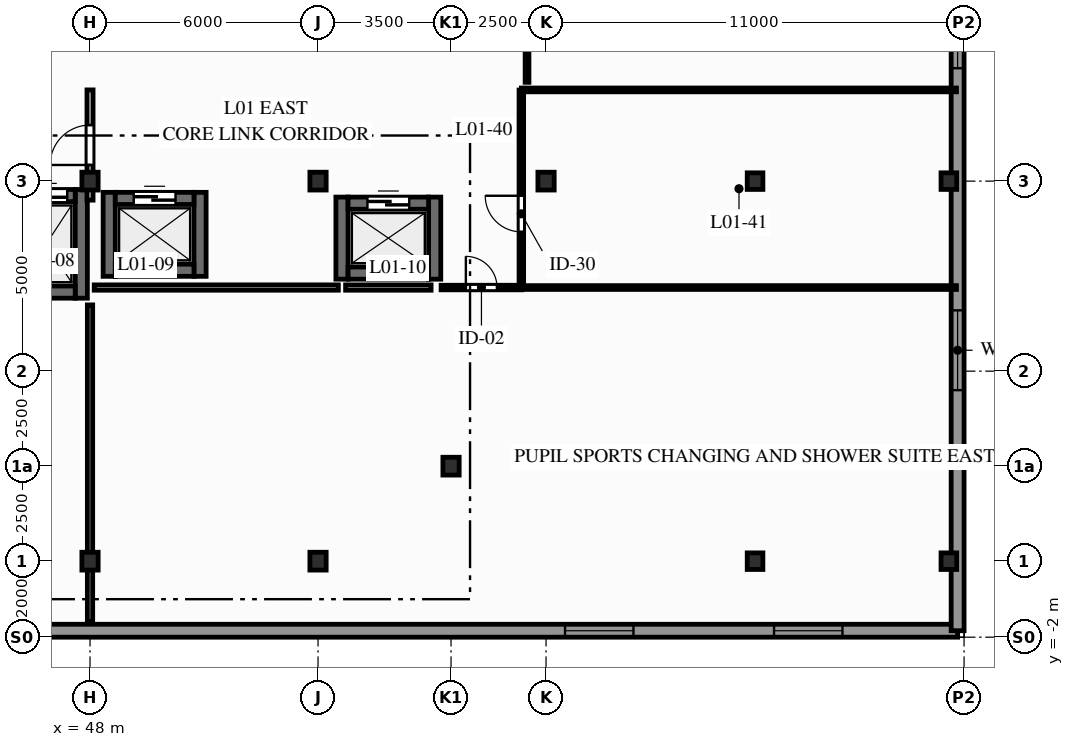
"""IFC4 building model, lengths in metres.
Left out: names, types, materials, properties, quantities, classifications, styles, units other than length and angle.
Written with IfcOpenShell. Run it as: python <this file> out.ifc"""

import sys

from ifc_helpers import new_model, si_unit, direction, frame, frame_2d, origin, origin_2d, place, context, subcontext, project, spatial, rectangle, i_section, extrude, element, fill, save


model = new_model("IFC4")
c1 = context("Model", 3, precision=1e-05, world=origin(), true_north=direction((0.0, 1.0)))
c2 = subcontext(c1, "Body", "Model", "MODEL_VIEW")
j1 = project(units=[si_unit("LENGTHUNIT", "METRE"), si_unit("PLANEANGLEUNIT", "RADIAN")], contexts=[c1])
p1 = place(None, origin())
s1 = spatial("IfcSite", under=j1, at=p1, CompositionType="ELEMENT")
p2 = place(p1, origin())
s2 = spatial("IfcBuilding", under=s1, at=p2, CompositionType="ELEMENT")
p3 = place(p2, frame((0.0, 0.0, 4.5)))
s3 = spatial("IfcBuildingStorey", under=s2, at=p3, CompositionType="ELEMENT", Elevation=4.5)
for number, where, z_axis, x_axis in (
    (1, (48.0, 0.0, 0.0), (0.0, 0.0, 1.0), (1.0, 0.0, 0.0)),
    (2, (48.0, 10.0, 0.0), (0.0, 0.0, 1.0), (1.0, 0.0, 0.0)),
    (3, (54.0, 0.0, 0.0), (0.0, 0.0, 1.0), (1.0, 0.0, 0.0)),
    (4, (54.0, 10.0, 0.0), (0.0, 0.0, 1.0), (1.0, 0.0, 0.0)),
    (5, (57.5, 2.5, 0.0), (0.0, 0.0, 1.0), (1.0, 0.0, 0.0)),
    (6, (60.0, 10.0, 0.0), (0.0, 0.0, 1.0), (1.0, 0.0, 0.0)),
):
    element("IfcColumn", number, at=place(p3, frame(where, z_axis=z_axis, x_axis=x_axis)), inside=s3, PredefinedType="COLUMN", context=c2, shape_type="SweptSolid", body=[
        extrude(i_section(OverallWidth=0.428, OverallDepth=0.469, WebThickness=0.078, FlangeThickness=0.125, FilletRadius=0.015, at=origin_2d()), origin(), (0.0, 0.0, 1.0), 4.5),
    ])
for number, where, z_axis, x_axis in (
    (7, (65.5, 0.0, 0.0), (0.0, 0.0, 1.0), (1.0, 0.0, 0.0)),
    (8, (65.5, 10.0, 0.0), (0.0, 0.0, 1.0), (1.0, 0.0, 0.0)),
    (9, (70.6, 0.0, 0.0), (0.0, 0.0, 1.0), (1.0, 0.0, 0.0)),
    (10, (70.6, 10.0, 0.0), (0.0, 0.0, 1.0), (1.0, 0.0, 0.0)),
):
    element("IfcColumn", number, at=place(p3, frame(where, z_axis=z_axis, x_axis=x_axis)), inside=s3, PredefinedType="COLUMN", context=c2, shape_type="SweptSolid", body=[
        extrude(i_section(OverallWidth=0.412, OverallDepth=0.437, WebThickness=0.036, FlangeThickness=0.058, FilletRadius=0.015, at=origin_2d()), origin(), (0.0, 0.0, 1.0), 4.5),
    ])
p4 = place(p3, frame((-10.83, -1.83, 0.0), z_axis=(0.0, 0.0, 1.0), x_axis=(1.0, 0.0, 0.0)))
e11 = element("IfcWall", 11, at=p4, inside=s3, PredefinedType="STANDARD", context=c2, shape_type="SweptSolid", body=[
    extrude(rectangle(XDim=81.66, YDim=0.34, at=frame_2d((40.83, 0.0))), origin(), (0.0, 0.0, 1.0), 4.22),
])
p5 = place(p4, frame((2.83, 0.0, 0.9)))
e12 = element("IfcOpeningElement", 12, at=p5, cuts=e11, PredefinedType="OPENING", context=c2, shape_type="SweptSolid", body=[
    extrude(rectangle(XDim=1.8, YDim=1.95, at=frame_2d((0.9, 0.975))), frame((0.0, 0.18, 0.0), z_axis=(0.0, -1.0, 0.0), x_axis=(1.0, 0.0, 0.0)), (0.0, 0.0, 1.0), 0.36),
])
p6 = place(p4, frame((8.33, 0.0, 0.9)))
e13 = element("IfcOpeningElement", 13, at=p6, cuts=e11, PredefinedType="OPENING", context=c2, shape_type="SweptSolid", body=[
    extrude(rectangle(XDim=1.8, YDim=1.95, at=frame_2d((0.9, 0.975))), frame((0.0, 0.18, 0.0), z_axis=(0.0, -1.0, 0.0), x_axis=(1.0, 0.0, 0.0)), (0.0, 0.0, 1.0), 0.36),
])
p7 = place(p4, frame((71.33, 0.0, 0.9)))
e14 = element("IfcOpeningElement", 14, at=p7, cuts=e11, PredefinedType="OPENING", context=c2, shape_type="SweptSolid", body=[
    extrude(rectangle(XDim=1.8, YDim=1.95, at=frame_2d((0.9, 0.975))), frame((0.0, 0.18, 0.0), z_axis=(0.0, -1.0, 0.0), x_axis=(1.0, 0.0, 0.0)), (0.0, 0.0, 1.0), 0.36),
])
p8 = place(p4, frame((76.83, 0.0, 0.9)))
e15 = element("IfcOpeningElement", 15, at=p8, cuts=e11, PredefinedType="OPENING", context=c2, shape_type="SweptSolid", body=[
    extrude(rectangle(XDim=1.8, YDim=1.95, at=frame_2d((0.9, 0.975))), frame((0.0, 0.18, 0.0), z_axis=(0.0, -1.0, 0.0), x_axis=(1.0, 0.0, 0.0)), (0.0, 0.0, 1.0), 0.36),
])
p9 = place(p3, frame((70.83, -1.83, 0.0), z_axis=(0.0, 0.0, 1.0), x_axis=(0.0, 1.0, 0.0)))
e16 = element("IfcWall", 16, at=p9, inside=s3, PredefinedType="STANDARD", context=c2, shape_type="SweptSolid", body=[
    extrude(rectangle(XDim=36.43, YDim=0.34, at=frame_2d((18.215, 0.0))), origin(), (0.0, 0.0, 1.0), 3.583),
])
p10 = place(p9, frame((6.33, 0.0, 0.9)))
e17 = element("IfcOpeningElement", 17, at=p10, cuts=e16, PredefinedType="OPENING", context=c2, shape_type="SweptSolid", body=[
    extrude(rectangle(XDim=2.1, YDim=2.05, at=frame_2d((1.05, 1.025))), frame((0.0, 0.18, 0.0), z_axis=(0.0, -1.0, 0.0), x_axis=(1.0, 0.0, 0.0)), (0.0, 0.0, 1.0), 0.36),
])
p11 = place(p9, frame((14.8, 0.0, 0.9)))
e18 = element("IfcOpeningElement", 18, at=p11, cuts=e16, PredefinedType="OPENING", context=c2, shape_type="SweptSolid", body=[
    extrude(rectangle(XDim=2.1, YDim=2.05, at=frame_2d((1.05, 1.025))), frame((0.0, 0.18, 0.0), z_axis=(0.0, -1.0, 0.0), x_axis=(1.0, 0.0, 0.0)), (0.0, 0.0, 1.0), 0.36),
])
p12 = place(p9, frame((21.03, 0.0, 0.9)))
e19 = element("IfcOpeningElement", 19, at=p12, cuts=e16, PredefinedType="OPENING", context=c2, shape_type="SweptSolid", body=[
    extrude(rectangle(XDim=2.1, YDim=2.05, at=frame_2d((1.05, 1.025))), frame((0.0, 0.18, 0.0), z_axis=(0.0, -1.0, 0.0), x_axis=(1.0, 0.0, 0.0)), (0.0, 0.0, 1.0), 0.36),
])
p13 = place(p9, frame((28.63, 0.0, 0.9)))
e20 = element("IfcOpeningElement", 20, at=p13, cuts=e16, PredefinedType="OPENING", context=c2, shape_type="SweptSolid", body=[
    extrude(rectangle(XDim=2.1, YDim=2.05, at=frame_2d((1.05, 1.025))), frame((0.0, 0.18, 0.0), z_axis=(0.0, -1.0, 0.0), x_axis=(1.0, 0.0, 0.0)), (0.0, 0.0, 1.0), 0.36),
])
p14 = place(p3, frame((47.77, 6.92, 0.0), z_axis=(0.0, 0.0, 1.0), x_axis=(0.0, 1.0, 0.0)))
e21 = element("IfcWall", 21, at=p14, inside=s3, PredefinedType="SHEAR", context=c2, shape_type="SweptSolid", body=[
    extrude(rectangle(XDim=2.86, YDim=0.32, at=frame_2d((1.43, 0.0))), origin(), (0.0, 0.0, 1.0), 4.22),
])
p15 = place(p3, frame((46.09, 7.08, 0.0), z_axis=(0.0, 0.0, 1.0), x_axis=(1.0, 0.0, 0.0)))
e22 = element("IfcWall", 22, at=p15, inside=s3, PredefinedType="SHEAR", context=c2, shape_type="SweptSolid", body=[
    extrude(rectangle(XDim=1.52, YDim=0.32, at=frame_2d((0.76, 0.0))), origin(), (0.0, 0.0, 1.0), 4.22),
])
p16 = place(p3, frame((46.09, 9.62, 0.0), z_axis=(0.0, 0.0, 1.0), x_axis=(1.0, 0.0, 0.0)))
e23 = element("IfcWall", 23, at=p16, inside=s3, PredefinedType="SHEAR", context=c2, shape_type="SweptSolid", body=[
    extrude(rectangle(XDim=1.52, YDim=0.32, at=frame_2d((0.76, 0.0))), origin(), (0.0, 0.0, 1.0), 4.22),
])
p17 = place(p16, frame((0.21, 0.0, 0.0)))
e24 = element("IfcOpeningElement", 24, at=p17, cuts=e23, PredefinedType="OPENING", context=c2, shape_type="SweptSolid", body=[
    extrude(rectangle(XDim=1.1, YDim=2.06, at=frame_2d((0.55, 1.03))), frame((0.0, 0.17, 0.0), z_axis=(0.0, -1.0, 0.0), x_axis=(1.0, 0.0, 0.0)), (0.0, 0.0, 1.0), 0.34),
])
for number, where, z_axis, x_axis in (
    (25, (48.505, 7.495, 0.0), (0.0, 0.0, 1.0), (0.0, 1.0, 0.0)),
    (26, (50.895, 7.495, 0.0), (0.0, 0.0, 1.0), (0.0, 1.0, 0.0)),
):
    element("IfcWall", number, at=place(p3, frame(where, z_axis=z_axis, x_axis=x_axis)), inside=s3, PredefinedType="SHEAR", context=c2, shape_type="SweptSolid", body=[
        extrude(rectangle(XDim=2.21, YDim=0.32, at=frame_2d((1.105, 0.0))), origin(), (0.0, 0.0, 1.0), 4.22),
    ])
p18 = place(p3, frame((48.665, 7.655, 0.0), z_axis=(0.0, 0.0, 1.0), x_axis=(1.0, 0.0, 0.0)))
e27 = element("IfcWall", 27, at=p18, inside=s3, PredefinedType="SHEAR", context=c2, shape_type="SweptSolid", body=[
    extrude(rectangle(XDim=2.07, YDim=0.32, at=frame_2d((1.035, 0.0))), origin(), (0.0, 0.0, 1.0), 4.22),
])
p19 = place(p3, frame((48.665, 9.545, 0.0), z_axis=(0.0, 0.0, 1.0), x_axis=(1.0, 0.0, 0.0)))
e28 = element("IfcWall", 28, at=p19, inside=s3, PredefinedType="SHEAR", context=c2, shape_type="SweptSolid", body=[
    extrude(rectangle(XDim=2.07, YDim=0.32, at=frame_2d((1.035, 0.0))), origin(), (0.0, 0.0, 1.0), 4.22),
])
p20 = place(p19, frame((0.485, 0.0, 0.0)))
e29 = element("IfcOpeningElement", 29, at=p20, cuts=e28, PredefinedType="OPENING", context=c2, shape_type="SweptSolid", body=[
    extrude(rectangle(XDim=1.1, YDim=2.06, at=frame_2d((0.55, 1.03))), frame((0.0, 0.17, 0.0), z_axis=(0.0, -1.0, 0.0), x_axis=(1.0, 0.0, 0.0)), (0.0, 0.0, 1.0), 0.34),
])
for number, where, z_axis, x_axis in (
    (30, (54.63, 7.42, 0.0), (0.0, 0.0, 1.0), (0.0, 1.0, 0.0)),
    (31, (57.07, 7.42, 0.0), (0.0, 0.0, 1.0), (0.0, 1.0, 0.0)),
):
    element("IfcWall", number, at=place(p3, frame(where, z_axis=z_axis, x_axis=x_axis)), inside=s3, PredefinedType="SHEAR", context=c2, shape_type="SweptSolid", body=[
        extrude(rectangle(XDim=2.16, YDim=0.32, at=frame_2d((1.08, 0.0))), origin(), (0.0, 0.0, 1.0), 4.22),
    ])
p21 = place(p3, frame((54.79, 7.58, 0.0), z_axis=(0.0, 0.0, 1.0), x_axis=(1.0, 0.0, 0.0)))
e32 = element("IfcWall", 32, at=p21, inside=s3, PredefinedType="SHEAR", context=c2, shape_type="SweptSolid", body=[
    extrude(rectangle(XDim=2.12, YDim=0.32, at=frame_2d((1.06, 0.0))), origin(), (0.0, 0.0, 1.0), 4.22),
])
p22 = place(p3, frame((54.79, 9.42, 0.0), z_axis=(0.0, 0.0, 1.0), x_axis=(1.0, 0.0, 0.0)))
e33 = element("IfcWall", 33, at=p22, inside=s3, PredefinedType="SHEAR", context=c2, shape_type="SweptSolid", body=[
    extrude(rectangle(XDim=2.12, YDim=0.32, at=frame_2d((1.06, 0.0))), origin(), (0.0, 0.0, 1.0), 4.22),
])
p23 = place(p22, frame((0.51, 0.0, 0.0)))
e34 = element("IfcOpeningElement", 34, at=p23, cuts=e33, PredefinedType="OPENING", context=c2, shape_type="SweptSolid", body=[
    extrude(rectangle(XDim=1.1, YDim=2.06, at=frame_2d((0.55, 1.03))), frame((0.0, 0.17, 0.0), z_axis=(0.0, -1.0, 0.0), x_axis=(1.0, 0.0, 0.0)), (0.0, 0.0, 1.0), 0.34),
])
p24 = place(p3, frame((48.0, 9.5, 0.0), z_axis=(0.0, 0.0, 1.0), x_axis=(0.0, 1.0, 0.0)))
e35 = element("IfcWall", 35, at=p24, inside=s3, PredefinedType="PARTITIONING", context=c2, shape_type="SweptSolid", body=[
    extrude(rectangle(XDim=2.9, YDim=0.16, at=frame_2d((1.45, 0.0))), origin(), (0.0, 0.0, 1.0), 3.268),
])
p25 = place(p24, frame((0.925, 0.0, 0.0)))
e36 = element("IfcOpeningElement", 36, at=p25, cuts=e35, PredefinedType="OPENING", context=c2, shape_type="SweptSolid", body=[
    extrude(rectangle(XDim=1.05, YDim=2.06, at=frame_2d((0.525, 1.03))), frame((0.0, 0.09, 0.0), z_axis=(0.0, -1.0, 0.0), x_axis=(1.0, 0.0, 0.0)), (0.0, 0.0, 1.0), 0.18),
])
p26 = place(p3, frame((59.5, 12.6, 0.0), z_axis=(0.0, 0.0, 1.0), x_axis=(0.0, 1.0, 0.0)))
e37 = element("IfcWall", 37, at=p26, inside=s3, PredefinedType="PARTITIONING", context=c2, shape_type="SweptSolid", body=[
    extrude(rectangle(XDim=14.5, YDim=0.1, at=frame_2d((7.25, 0.0))), origin(), (0.0, 0.0, 1.0), 4.22),
])
p27 = place(p3, frame((59.35, 12.4, 0.0), z_axis=(0.0, 0.0, 1.0), x_axis=(1.0, 0.0, 0.0)))
e38 = element("IfcWall", 38, at=p27, inside=s3, PredefinedType="PARTITIONING", context=c2, shape_type="SweptSolid", body=[
    extrude(rectangle(XDim=11.45, YDim=0.1, at=frame_2d((5.725, 0.0))), origin(), (0.0, 0.0, 1.0), 3.268),
])
p28 = place(p3, frame((57.239, 7.2, 0.0), z_axis=(0.0, 0.0, 1.0), x_axis=(1.0, 0.0, 0.0)))
e39 = element("IfcWall", 39, at=p28, inside=s3, PredefinedType="PARTITIONING", context=c2, shape_type="SweptSolid", body=[
    extrude(rectangle(XDim=2.123, YDim=0.12, at=frame_2d((1.061, 0.0))), origin(), (0.0, 0.0, 1.0), 4.22),
])
p29 = place(p28, frame((0.651, 0.0, 0.0)))
e40 = element("IfcOpeningElement", 40, at=p29, cuts=e39, PredefinedType="OPENING", context=c2, shape_type="SweptSolid", body=[
    extrude(rectangle(XDim=0.82, YDim=2.02, at=frame_2d((0.41, 1.01))), frame((0.0, 0.07, 0.0), z_axis=(0.0, -1.0, 0.0), x_axis=(1.0, 0.0, 0.0)), (0.0, 0.0, 1.0), 0.14),
])
p30 = place(p3, frame((59.343, 7.2, 0.0), z_axis=(0.0, 0.0, 1.0), x_axis=(1.0, 0.0, 0.0)))
e41 = element("IfcWall", 41, at=p30, inside=s3, PredefinedType="PARTITIONING", context=c2, shape_type="SweptSolid", body=[
    extrude(rectangle(XDim=11.457, YDim=0.1, at=frame_2d((5.729, 0.0))), origin(), (0.0, 0.0, 1.0), 3.268),
])
p31 = place(p3, frame((59.35, 7.204, 0.0), z_axis=(0.0, 0.0, 1.0), x_axis=(0.0, 1.0, 0.0)))
e42 = element("IfcWall", 42, at=p31, inside=s3, PredefinedType="PARTITIONING", context=c2, shape_type="SweptSolid", body=[
    extrude(rectangle(XDim=5.192, YDim=0.12, at=frame_2d((2.596, 0.0))), origin(), (0.0, 0.0, 1.0), 3.268),
])
p32 = place(p31, frame((1.461, 0.0, 0.0)))
e43 = element("IfcOpeningElement", 43, at=p32, cuts=e42, PredefinedType="OPENING", context=c2, shape_type="SweptSolid", body=[
    extrude(rectangle(XDim=0.95, YDim=2.05, at=frame_2d((0.475, 1.025))), frame((0.0, 0.07, 0.0), z_axis=(0.0, -1.0, 0.0), x_axis=(1.0, 0.0, 0.0)), (0.0, 0.0, 1.0), 0.14),
])
p33 = place(p3, frame((54.726, 7.2, 0.0), z_axis=(0.0, 0.0, 1.0), x_axis=(1.0, 0.0, 0.0)))
e44 = element("IfcWall", 44, at=p33, inside=s3, PredefinedType="PARTITIONING", context=c2, shape_type="SweptSolid", body=[
    extrude(rectangle(XDim=2.249, YDim=0.14, at=frame_2d((1.125, 0.0))), origin(), (0.0, 0.0, 1.0), 4.22),
])
p34 = place(p3, frame((48.11, 7.2, 0.0), z_axis=(0.0, 0.0, 1.0), x_axis=(1.0, 0.0, 0.0)))
e45 = element("IfcWall", 45, at=p34, inside=s3, PredefinedType="PARTITIONING", context=c2, shape_type="SweptSolid", body=[
    extrude(rectangle(XDim=6.424, YDim=0.14, at=frame_2d((3.212, 0.0))), origin(), (0.0, 0.0, 1.0), 3.268),
])
p35 = place(p3, frame((48.0, -1.59, 0.0), z_axis=(0.0, 0.0, 1.0), x_axis=(0.0, 1.0, 0.0)))
e46 = element("IfcWall", 46, at=p35, inside=s3, PredefinedType="PARTITIONING", context=c2, shape_type="SweptSolid", body=[
    extrude(rectangle(XDim=8.333, YDim=0.14, at=frame_2d((4.167, 0.0))), origin(), (0.0, 0.0, 1.0), 3.268),
])
p36 = place(p7, origin())
e47 = element("IfcWindow", 47, at=p36, inside=s3, PartitioningType="SINGLE_PANEL", PredefinedType="WINDOW", context=c2, shape_type="SweptSolid", body=[
    extrude(rectangle(XDim=1.8, YDim=1.95, at=frame_2d((0.9, 0.975))), frame((0.0, 0.03, 0.0), z_axis=(0.0, -1.0, 0.0), x_axis=(1.0, 0.0, 0.0)), (0.0, 0.0, 1.0), 0.06),
])
fill(e14, e47)
p37 = place(p8, origin())
e48 = element("IfcWindow", 48, at=p37, inside=s3, PartitioningType="SINGLE_PANEL", PredefinedType="WINDOW", context=c2, shape_type="SweptSolid", body=[
    extrude(rectangle(XDim=1.8, YDim=1.95, at=frame_2d((0.9, 0.975))), frame((0.0, 0.03, 0.0), z_axis=(0.0, -1.0, 0.0), x_axis=(1.0, 0.0, 0.0)), (0.0, 0.0, 1.0), 0.06),
])
fill(e15, e48)
p38 = place(p10, origin())
e49 = element("IfcWindow", 49, at=p38, inside=s3, PartitioningType="SINGLE_PANEL", PredefinedType="WINDOW", context=c2, shape_type="SweptSolid", body=[
    extrude(rectangle(XDim=2.1, YDim=2.05, at=frame_2d((1.05, 1.025))), frame((0.0, 0.03, 0.0), z_axis=(0.0, -1.0, 0.0), x_axis=(1.0, 0.0, 0.0)), (0.0, 0.0, 1.0), 0.06),
])
fill(e17, e49)
p39 = place(p11, origin())
e50 = element("IfcWindow", 50, at=p39, inside=s3, PartitioningType="SINGLE_PANEL", PredefinedType="WINDOW", context=c2, shape_type="SweptSolid", body=[
    extrude(rectangle(XDim=2.1, YDim=2.05, at=frame_2d((1.05, 1.025))), frame((0.0, 0.03, 0.0), z_axis=(0.0, -1.0, 0.0), x_axis=(1.0, 0.0, 0.0)), (0.0, 0.0, 1.0), 0.06),
])
fill(e18, e50)
p40 = place(p17, origin())
e51 = element("IfcDoor", 51, at=p40, inside=s3, OperationType="SLIDING_TO_RIGHT", PredefinedType="DOOR", context=c2, shape_type="SweptSolid", body=[
    extrude(rectangle(XDim=1.1, YDim=2.06, at=frame_2d((0.55, 1.03))), frame((0.0, 0.025, 0.0), z_axis=(0.0, -1.0, 0.0), x_axis=(1.0, 0.0, 0.0)), (0.0, 0.0, 1.0), 0.05),
])
fill(e24, e51)
p41 = place(p20, origin())
e52 = element("IfcDoor", 52, at=p41, inside=s3, OperationType="SLIDING_TO_LEFT", PredefinedType="DOOR", context=c2, shape_type="SweptSolid", body=[
    extrude(rectangle(XDim=1.1, YDim=2.06, at=frame_2d((0.55, 1.03))), frame((0.0, 0.025, 0.0), z_axis=(0.0, -1.0, 0.0), x_axis=(1.0, 0.0, 0.0)), (0.0, 0.0, 1.0), 0.05),
])
fill(e29, e52)
p42 = place(p23, origin())
e53 = element("IfcDoor", 53, at=p42, inside=s3, OperationType="SLIDING_TO_RIGHT", PredefinedType="DOOR", context=c2, shape_type="SweptSolid", body=[
    extrude(rectangle(XDim=1.1, YDim=2.06, at=frame_2d((0.55, 1.03))), frame((0.0, 0.025, 0.0), z_axis=(0.0, -1.0, 0.0), x_axis=(1.0, 0.0, 0.0)), (0.0, 0.0, 1.0), 0.05),
])
fill(e34, e53)
p43 = place(p25, origin())
e54 = element("IfcDoor", 54, at=p43, inside=s3, OperationType="SINGLE_SWING_LEFT", PredefinedType="DOOR", context=c2, shape_type="SweptSolid", body=[
    extrude(rectangle(XDim=1.05, YDim=2.06, at=frame_2d((0.525, 1.03))), frame((0.0, 0.025, 0.0), z_axis=(0.0, -1.0, 0.0), x_axis=(1.0, 0.0, 0.0)), (0.0, 0.0, 1.0), 0.05),
])
fill(e36, e54)
p44 = place(p29, origin())
e55 = element("IfcDoor", 55, at=p44, inside=s3, OperationType="SINGLE_SWING_LEFT", PredefinedType="DOOR", context=c2, shape_type="SweptSolid", body=[
    extrude(rectangle(XDim=0.82, YDim=2.02, at=frame_2d((0.41, 1.01))), frame((0.0, 0.025, 0.0), z_axis=(0.0, -1.0, 0.0), x_axis=(1.0, 0.0, 0.0)), (0.0, 0.0, 1.0), 0.05),
])
fill(e40, e55)
p45 = place(p32, origin())
e56 = element("IfcDoor", 56, at=p45, inside=s3, OperationType="SINGLE_SWING_RIGHT", PredefinedType="DOOR", context=c2, shape_type="SweptSolid", body=[
    extrude(rectangle(XDim=0.95, YDim=2.05, at=frame_2d((0.475, 1.025))), frame((0.0, 0.025, 0.0), z_axis=(0.0, -1.0, 0.0), x_axis=(1.0, 0.0, 0.0)), (0.0, 0.0, 1.0), 0.05),
])
fill(e43, e56)
save(model, sys.argv[1])
